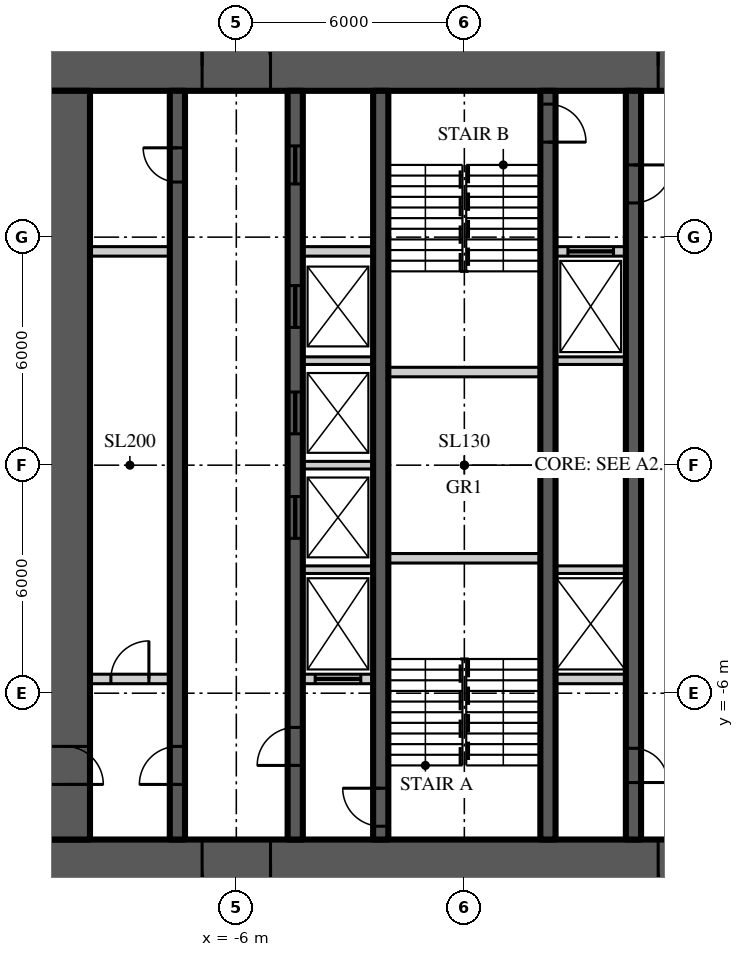
"""IFC4 building model, lengths in metres.
Left out: names, types, materials, properties, quantities, classifications, styles, units other than length and angle.
Written with IfcOpenShell. Run it as: python <this file> out.ifc"""

import sys

from ifc_helpers import new_model, si_unit, direction, frame, frame_2d, origin, place, context, subcontext, project, spatial, rectangle, extrude, element, fill, save


model = new_model("IFC4")
c1 = context("Model", 3, precision=1e-05, world=origin(), true_north=direction((0.0, 1.0)))
c2 = subcontext(c1, "Body", "Model", "MODEL_VIEW")
j1 = project(units=[si_unit("LENGTHUNIT", "METRE"), si_unit("PLANEANGLEUNIT", "RADIAN")], contexts=[c1])
p1 = place(None, origin())
s1 = spatial("IfcSite", under=j1, at=p1, CompositionType="ELEMENT")
p2 = place(p1, origin())
s2 = spatial("IfcBuilding", under=s1, at=p2, CompositionType="ELEMENT")
p3 = place(p2, frame((0.0, 0.0, 151.5)))
s3 = spatial("IfcBuildingStorey", under=s2, at=p3, CompositionType="ELEMENT", Elevation=151.5)
p4 = place(p3, frame((-11.15, 10.5, 0.0), z_axis=(0.0, 0.0, 1.0), x_axis=(1.0, 0.0, 0.0)))
e1 = element("IfcWall", 1, at=p4, inside=s3, PredefinedType="SHEAR", context=c2, shape_type="SweptSolid", body=[
    extrude(rectangle(XDim=22.3, YDim=1.3, at=frame_2d((11.15, 0.0))), origin(), (0.0, 0.0, 1.0), 3.9),
])
p5 = place(p4, frame((4.25, 0.0, 0.0)))
e2 = element("IfcOpeningElement", 2, at=p5, cuts=e1, PredefinedType="OPENING", context=c2, shape_type="SweptSolid", body=[
    extrude(rectangle(XDim=1.8, YDim=2.2, at=frame_2d((0.9, 1.1))), frame((0.0, 0.66, 0.0), z_axis=(0.0, -1.0, 0.0), x_axis=(1.0, 0.0, 0.0)), (0.0, 0.0, 1.0), 1.32),
])
p6 = place(p4, frame((16.25, 0.0, 0.0)))
e3 = element("IfcOpeningElement", 3, at=p6, cuts=e1, PredefinedType="OPENING", context=c2, shape_type="SweptSolid", body=[
    extrude(rectangle(XDim=1.8, YDim=2.2, at=frame_2d((0.9, 1.1))), frame((0.0, 0.66, 0.0), z_axis=(0.0, -1.0, 0.0), x_axis=(1.0, 0.0, 0.0)), (0.0, 0.0, 1.0), 1.32),
])
p7 = place(p3, frame((11.15, -10.5, 0.0), z_axis=(0.0, 0.0, 1.0), x_axis=(-1.0, 0.0, 0.0)))
e4 = element("IfcWall", 4, at=p7, inside=s3, PredefinedType="SHEAR", context=c2, shape_type="SweptSolid", body=[
    extrude(rectangle(XDim=22.3, YDim=1.3, at=frame_2d((11.15, 0.0))), origin(), (0.0, 0.0, 1.0), 3.9),
])
p8 = place(p7, frame((16.25, 0.0, 0.0)))
e5 = element("IfcOpeningElement", 5, at=p8, cuts=e4, PredefinedType="OPENING", context=c2, shape_type="SweptSolid", body=[
    extrude(rectangle(XDim=1.8, YDim=2.2, at=frame_2d((0.9, 1.1))), frame((0.0, 0.66, 0.0), z_axis=(0.0, -1.0, 0.0), x_axis=(1.0, 0.0, 0.0)), (0.0, 0.0, 1.0), 1.32),
])
p9 = place(p7, frame((4.25, 0.0, 0.0)))
e6 = element("IfcOpeningElement", 6, at=p9, cuts=e4, PredefinedType="OPENING", context=c2, shape_type="SweptSolid", body=[
    extrude(rectangle(XDim=1.8, YDim=2.2, at=frame_2d((0.9, 1.1))), frame((0.0, 0.66, 0.0), z_axis=(0.0, -1.0, 0.0), x_axis=(1.0, 0.0, 0.0)), (0.0, 0.0, 1.0), 1.32),
])
p10 = place(p3, frame((-10.5, 9.85, 0.0), z_axis=(0.0, 0.0, 1.0), x_axis=(0.0, -1.0, 0.0)))
e7 = element("IfcWall", 7, at=p10, inside=s3, PredefinedType="SHEAR", context=c2, shape_type="SweptSolid", body=[
    extrude(rectangle(XDim=19.7, YDim=1.3, at=frame_2d((9.85, 0.0))), origin(), (0.0, 0.0, 1.0), 3.9),
])
p11 = place(p10, frame((17.25, 0.0, 0.0)))
e8 = element("IfcOpeningElement", 8, at=p11, cuts=e7, PredefinedType="OPENING", context=c2, shape_type="SweptSolid", body=[
    extrude(rectangle(XDim=1.0, YDim=2.2, at=frame_2d((0.5, 1.1))), frame((0.0, 0.66, 0.0), z_axis=(0.0, -1.0, 0.0), x_axis=(1.0, 0.0, 0.0)), (0.0, 0.0, 1.0), 1.32),
])
p12 = place(p3, frame((-7.55, -9.85, 0.0), z_axis=(0.0, 0.0, 1.0), x_axis=(0.0, 1.0, 0.0)))
e9 = element("IfcWall", 9, at=p12, inside=s3, PredefinedType="SHEAR", context=c2, shape_type="SweptSolid", body=[
    extrude(rectangle(XDim=19.7, YDim=0.4, at=frame_2d((9.85, 0.0))), origin(), (0.0, 0.0, 1.0), 3.9),
])
p13 = place(p12, frame((1.45, 0.0, 0.0)))
e10 = element("IfcOpeningElement", 10, at=p13, cuts=e9, PredefinedType="OPENING", context=c2, shape_type="SweptSolid", body=[
    extrude(rectangle(XDim=1.0, YDim=2.2, at=frame_2d((0.5, 1.1))), frame((0.0, 0.21, 0.0), z_axis=(0.0, -1.0, 0.0), x_axis=(1.0, 0.0, 0.0)), (0.0, 0.0, 1.0), 0.42),
])
p14 = place(p12, frame((17.3, 0.0, 0.0)))
e11 = element("IfcOpeningElement", 11, at=p14, cuts=e9, PredefinedType="OPENING", context=c2, shape_type="SweptSolid", body=[
    extrude(rectangle(XDim=0.9, YDim=2.1, at=frame_2d((0.45, 1.05))), frame((0.0, 0.21, 0.0), z_axis=(0.0, -1.0, 0.0), x_axis=(1.0, 0.0, 0.0)), (0.0, 0.0, 1.0), 0.42),
])
p15 = place(p3, frame((-4.45, -9.85, 0.0), z_axis=(0.0, 0.0, 1.0), x_axis=(0.0, 1.0, 0.0)))
e12 = element("IfcWall", 12, at=p15, inside=s3, PredefinedType="SHEAR", context=c2, shape_type="SweptSolid", body=[
    extrude(rectangle(XDim=19.7, YDim=0.4, at=frame_2d((9.85, 0.0))), origin(), (0.0, 0.0, 1.0), 3.9),
])
p16 = place(p15, frame((1.95, 0.0, 0.0)))
e13 = element("IfcOpeningElement", 13, at=p16, cuts=e12, PredefinedType="OPENING", context=c2, shape_type="SweptSolid", body=[
    extrude(rectangle(XDim=1.0, YDim=2.2, at=frame_2d((0.5, 1.1))), frame((0.0, 0.21, 0.0), z_axis=(0.0, -1.0, 0.0), x_axis=(1.0, 0.0, 0.0)), (0.0, 0.0, 1.0), 0.42),
])
p17 = place(p15, frame((17.25, 0.0, 0.0)))
e14 = element("IfcOpeningElement", 14, at=p17, cuts=e12, PredefinedType="OPENING", context=c2, shape_type="SweptSolid", body=[
    extrude(rectangle(XDim=1.0, YDim=2.1, at=frame_2d((0.5, 1.05))), frame((0.0, 0.21, 0.0), z_axis=(0.0, -1.0, 0.0), x_axis=(1.0, 0.0, 0.0)), (0.0, 0.0, 1.0), 0.42),
])
p18 = place(p15, frame((7.925, 0.0, 0.0)))
e15 = element("IfcOpeningElement", 15, at=p18, cuts=e12, PredefinedType="OPENING", context=c2, shape_type="SweptSolid", body=[
    extrude(rectangle(XDim=1.1, YDim=2.2, at=frame_2d((0.55, 1.1))), frame((0.0, 0.21, 0.0), z_axis=(0.0, -1.0, 0.0), x_axis=(1.0, 0.0, 0.0)), (0.0, 0.0, 1.0), 0.42),
])
p19 = place(p15, frame((10.675, 0.0, 0.0)))
e16 = element("IfcOpeningElement", 16, at=p19, cuts=e12, PredefinedType="OPENING", context=c2, shape_type="SweptSolid", body=[
    extrude(rectangle(XDim=1.1, YDim=2.2, at=frame_2d((0.55, 1.1))), frame((0.0, 0.21, 0.0), z_axis=(0.0, -1.0, 0.0), x_axis=(1.0, 0.0, 0.0)), (0.0, 0.0, 1.0), 0.42),
])
p20 = place(p15, frame((13.475, 0.0, 0.0)))
e17 = element("IfcOpeningElement", 17, at=p20, cuts=e12, PredefinedType="OPENING", context=c2, shape_type="SweptSolid", body=[
    extrude(rectangle(XDim=1.1, YDim=2.2, at=frame_2d((0.55, 1.1))), frame((0.0, 0.21, 0.0), z_axis=(0.0, -1.0, 0.0), x_axis=(1.0, 0.0, 0.0)), (0.0, 0.0, 1.0), 0.42),
])
p21 = place(p3, frame((4.45, 9.85, 0.0), z_axis=(0.0, 0.0, 1.0), x_axis=(0.0, -1.0, 0.0)))
e18 = element("IfcWall", 18, at=p21, inside=s3, PredefinedType="SHEAR", context=c2, shape_type="SweptSolid", body=[
    extrude(rectangle(XDim=19.7, YDim=0.4, at=frame_2d((9.85, 0.0))), origin(), (0.0, 0.0, 1.0), 3.9),
])
p22 = place(p21, frame((1.95, 0.0, 0.0)))
e19 = element("IfcOpeningElement", 19, at=p22, cuts=e18, PredefinedType="OPENING", context=c2, shape_type="SweptSolid", body=[
    extrude(rectangle(XDim=1.0, YDim=2.2, at=frame_2d((0.5, 1.1))), frame((0.0, 0.21, 0.0), z_axis=(0.0, -1.0, 0.0), x_axis=(1.0, 0.0, 0.0)), (0.0, 0.0, 1.0), 0.42),
])
p23 = place(p21, frame((17.3, 0.0, 0.0)))
e20 = element("IfcOpeningElement", 20, at=p23, cuts=e18, PredefinedType="OPENING", context=c2, shape_type="SweptSolid", body=[
    extrude(rectangle(XDim=0.9, YDim=2.1, at=frame_2d((0.45, 1.05))), frame((0.0, 0.21, 0.0), z_axis=(0.0, -1.0, 0.0), x_axis=(1.0, 0.0, 0.0)), (0.0, 0.0, 1.0), 0.42),
])
p24 = place(p3, frame((-2.2, -9.85, 0.0), z_axis=(0.0, 0.0, 1.0), x_axis=(0.0, 1.0, 0.0)))
e21 = element("IfcWall", 21, at=p24, inside=s3, PredefinedType="SHEAR", context=c2, shape_type="SweptSolid", body=[
    extrude(rectangle(XDim=19.7, YDim=0.4, at=frame_2d((9.85, 0.0))), origin(), (0.0, 0.0, 1.0), 3.9),
])
p25 = place(p24, frame((0.35, 0.0, 0.0)))
e22 = element("IfcOpeningElement", 22, at=p25, cuts=e21, PredefinedType="OPENING", context=c2, shape_type="SweptSolid", body=[
    extrude(rectangle(XDim=1.0, YDim=2.2, at=frame_2d((0.5, 1.1))), frame((0.0, 0.21, 0.0), z_axis=(0.0, -1.0, 0.0), x_axis=(1.0, 0.0, 0.0)), (0.0, 0.0, 1.0), 0.42),
])
p26 = place(p3, frame((2.2, 9.85, 0.0), z_axis=(0.0, 0.0, 1.0), x_axis=(0.0, -1.0, 0.0)))
e23 = element("IfcWall", 23, at=p26, inside=s3, PredefinedType="SHEAR", context=c2, shape_type="SweptSolid", body=[
    extrude(rectangle(XDim=19.7, YDim=0.4, at=frame_2d((9.85, 0.0))), origin(), (0.0, 0.0, 1.0), 3.9),
])
p27 = place(p26, frame((0.35, 0.0, 0.0)))
e24 = element("IfcOpeningElement", 24, at=p27, cuts=e23, PredefinedType="OPENING", context=c2, shape_type="SweptSolid", body=[
    extrude(rectangle(XDim=1.0, YDim=2.2, at=frame_2d((0.5, 1.1))), frame((0.0, 0.21, 0.0), z_axis=(0.0, -1.0, 0.0), x_axis=(1.0, 0.0, 0.0)), (0.0, 0.0, 1.0), 0.42),
])
p28 = place(p3, frame((-9.85, 5.625, 0.0), z_axis=(0.0, 0.0, 1.0), x_axis=(1.0, 0.0, 0.0)))
e25 = element("IfcWall", 25, at=p28, inside=s3, PredefinedType="SOLIDWALL", context=c2, shape_type="SweptSolid", body=[
    extrude(rectangle(XDim=2.1, YDim=0.25, at=frame_2d((1.05, 0.0))), origin(), (0.0, 0.0, 1.0), 3.7),
])
p29 = place(p3, frame((-4.25, 5.625, 0.0), z_axis=(0.0, 0.0, 1.0), x_axis=(1.0, 0.0, 0.0)))
e26 = element("IfcWall", 26, at=p29, inside=s3, PredefinedType="SOLIDWALL", context=c2, shape_type="SweptSolid", body=[
    extrude(rectangle(XDim=1.85, YDim=0.25, at=frame_2d((0.925, 0.0))), origin(), (0.0, 0.0, 1.0), 3.7),
])
p30 = place(p3, frame((2.4, 5.625, 0.0), z_axis=(0.0, 0.0, 1.0), x_axis=(1.0, 0.0, 0.0)))
e27 = element("IfcWall", 27, at=p30, inside=s3, PredefinedType="SOLIDWALL", context=c2, shape_type="SweptSolid", body=[
    extrude(rectangle(XDim=1.85, YDim=0.25, at=frame_2d((0.925, 0.0))), origin(), (0.0, 0.0, 1.0), 3.7),
])
p31 = place(p30, frame((0.325, 0.0, 0.0)))
e28 = element("IfcOpeningElement", 28, at=p31, cuts=e27, PredefinedType="OPENING", context=c2, shape_type="SweptSolid", body=[
    extrude(rectangle(XDim=1.2, YDim=2.2, at=frame_2d((0.6, 1.1))), frame((0.0, 0.135, 0.0), z_axis=(0.0, -1.0, 0.0), x_axis=(1.0, 0.0, 0.0)), (0.0, 0.0, 1.0), 0.27),
])
p32 = place(p3, frame((-9.85, -5.625, 0.0), z_axis=(0.0, 0.0, 1.0), x_axis=(1.0, 0.0, 0.0)))
e29 = element("IfcWall", 29, at=p32, inside=s3, PredefinedType="SOLIDWALL", context=c2, shape_type="SweptSolid", body=[
    extrude(rectangle(XDim=2.1, YDim=0.25, at=frame_2d((1.05, 0.0))), origin(), (0.0, 0.0, 1.0), 3.7),
])
p33 = place(p32, frame((0.55, 0.0, 0.0)))
e30 = element("IfcOpeningElement", 30, at=p33, cuts=e29, PredefinedType="OPENING", context=c2, shape_type="SweptSolid", body=[
    extrude(rectangle(XDim=1.0, YDim=2.2, at=frame_2d((0.5, 1.1))), frame((0.0, 0.135, 0.0), z_axis=(0.0, -1.0, 0.0), x_axis=(1.0, 0.0, 0.0)), (0.0, 0.0, 1.0), 0.27),
])
p34 = place(p3, frame((-4.25, -5.625, 0.0), z_axis=(0.0, 0.0, 1.0), x_axis=(1.0, 0.0, 0.0)))
e31 = element("IfcWall", 31, at=p34, inside=s3, PredefinedType="SOLIDWALL", context=c2, shape_type="SweptSolid", body=[
    extrude(rectangle(XDim=1.85, YDim=0.25, at=frame_2d((0.925, 0.0))), origin(), (0.0, 0.0, 1.0), 3.7),
])
p35 = place(p34, frame((0.325, 0.0, 0.0)))
e32 = element("IfcOpeningElement", 32, at=p35, cuts=e31, PredefinedType="OPENING", context=c2, shape_type="SweptSolid", body=[
    extrude(rectangle(XDim=1.2, YDim=2.2, at=frame_2d((0.6, 1.1))), frame((0.0, 0.135, 0.0), z_axis=(0.0, -1.0, 0.0), x_axis=(1.0, 0.0, 0.0)), (0.0, 0.0, 1.0), 0.27),
])
p36 = place(p3, frame((2.4, -5.625, 0.0), z_axis=(0.0, 0.0, 1.0), x_axis=(1.0, 0.0, 0.0)))
e33 = element("IfcWall", 33, at=p36, inside=s3, PredefinedType="SOLIDWALL", context=c2, shape_type="SweptSolid", body=[
    extrude(rectangle(XDim=1.85, YDim=0.25, at=frame_2d((0.925, 0.0))), origin(), (0.0, 0.0, 1.0), 3.7),
])
for number, where, z_axis, x_axis in (
    (34, (-2.0, -2.45, 0.0), (0.0, 0.0, 1.0), (1.0, 0.0, 0.0)),
    (35, (-2.0, 2.45, 0.0), (0.0, 0.0, 1.0), (1.0, 0.0, 0.0)),
):
    element("IfcWall", number, at=place(p3, frame(where, z_axis=z_axis, x_axis=x_axis)), inside=s3, PredefinedType="SOLIDWALL", context=c2, shape_type="SweptSolid", body=[
        extrude(rectangle(XDim=4.0, YDim=0.25, at=frame_2d((2.0, 0.0))), origin(), (0.0, 0.0, 1.0), 3.7),
    ])
for number, where, z_axis, x_axis in (
    (36, (-4.25, -2.75, 0.0), (0.0, 0.0, 1.0), (1.0, 0.0, 0.0)),
    (37, (2.4, -2.75, 0.0), (0.0, 0.0, 1.0), (1.0, 0.0, 0.0)),
    (38, (-4.25, 0.0, 0.0), (0.0, 0.0, 1.0), (1.0, 0.0, 0.0)),
    (39, (-4.25, 2.75, 0.0), (0.0, 0.0, 1.0), (1.0, 0.0, 0.0)),
    (40, (2.4, 2.75, 0.0), (0.0, 0.0, 1.0), (1.0, 0.0, 0.0)),
):
    element("IfcWall", number, at=place(p3, frame(where, z_axis=z_axis, x_axis=x_axis)), inside=s3, PredefinedType="SOLIDWALL", context=c2, shape_type="SweptSolid", body=[
        extrude(rectangle(XDim=1.85, YDim=0.2, at=frame_2d((0.925, 0.0))), origin(), (0.0, 0.0, 1.0), 3.7),
    ])
p37 = place(p5, origin())
e41 = element("IfcDoor", 41, at=p37, inside=s3, OperationType="DOUBLE_DOOR_DOUBLE_SWING", PredefinedType="DOOR", context=c2, shape_type="SweptSolid", body=[
    extrude(rectangle(XDim=1.8, YDim=2.2, at=frame_2d((0.9, 1.1))), frame((0.0, 0.025, 0.0), z_axis=(0.0, -1.0, 0.0), x_axis=(1.0, 0.0, 0.0)), (0.0, 0.0, 1.0), 0.05),
])
fill(e2, e41)
p38 = place(p8, origin())
e42 = element("IfcDoor", 42, at=p38, inside=s3, OperationType="DOUBLE_DOOR_DOUBLE_SWING", PredefinedType="DOOR", context=c2, shape_type="SweptSolid", body=[
    extrude(rectangle(XDim=1.8, YDim=2.2, at=frame_2d((0.9, 1.1))), frame((0.0, 0.025, 0.0), z_axis=(0.0, -1.0, 0.0), x_axis=(1.0, 0.0, 0.0)), (0.0, 0.0, 1.0), 0.05),
])
fill(e5, e42)
p39 = place(p6, origin())
e43 = element("IfcDoor", 43, at=p39, inside=s3, OperationType="DOUBLE_DOOR_DOUBLE_SWING", PredefinedType="DOOR", context=c2, shape_type="SweptSolid", body=[
    extrude(rectangle(XDim=1.8, YDim=2.2, at=frame_2d((0.9, 1.1))), frame((0.0, 0.025, 0.0), z_axis=(0.0, -1.0, 0.0), x_axis=(1.0, 0.0, 0.0)), (0.0, 0.0, 1.0), 0.05),
])
fill(e3, e43)
p40 = place(p9, origin())
e44 = element("IfcDoor", 44, at=p40, inside=s3, OperationType="DOUBLE_DOOR_DOUBLE_SWING", PredefinedType="DOOR", context=c2, shape_type="SweptSolid", body=[
    extrude(rectangle(XDim=1.8, YDim=2.2, at=frame_2d((0.9, 1.1))), frame((0.0, 0.025, 0.0), z_axis=(0.0, -1.0, 0.0), x_axis=(1.0, 0.0, 0.0)), (0.0, 0.0, 1.0), 0.05),
])
fill(e6, e44)
p41 = place(p13, origin())
e45 = element("IfcDoor", 45, at=p41, inside=s3, OperationType="SINGLE_SWING_LEFT", PredefinedType="DOOR", context=c2, shape_type="SweptSolid", body=[
    extrude(rectangle(XDim=1.0, YDim=2.2, at=frame_2d((0.5, 1.1))), frame((0.0, 0.025, 0.0), z_axis=(0.0, -1.0, 0.0), x_axis=(1.0, 0.0, 0.0)), (0.0, 0.0, 1.0), 0.05),
])
fill(e10, e45)
p42 = place(p11, origin())
e46 = element("IfcDoor", 46, at=p42, inside=s3, OperationType="SINGLE_SWING_RIGHT", PredefinedType="DOOR", context=c2, shape_type="SweptSolid", body=[
    extrude(rectangle(XDim=1.0, YDim=2.2, at=frame_2d((0.5, 1.1))), frame((0.0, 0.025, 0.0), z_axis=(0.0, -1.0, 0.0), x_axis=(1.0, 0.0, 0.0)), (0.0, 0.0, 1.0), 0.05),
])
fill(e8, e46)
p43 = place(p16, origin())
e47 = element("IfcDoor", 47, at=p43, inside=s3, OperationType="SINGLE_SWING_LEFT", PredefinedType="DOOR", context=c2, shape_type="SweptSolid", body=[
    extrude(rectangle(XDim=1.0, YDim=2.2, at=frame_2d((0.5, 1.1))), frame((0.0, 0.025, 0.0), z_axis=(0.0, -1.0, 0.0), x_axis=(1.0, 0.0, 0.0)), (0.0, 0.0, 1.0), 0.05),
])
fill(e13, e47)
p44 = place(p25, origin())
e48 = element("IfcDoor", 48, at=p44, inside=s3, OperationType="SINGLE_SWING_RIGHT", PredefinedType="DOOR", context=c2, shape_type="SweptSolid", body=[
    extrude(rectangle(XDim=1.0, YDim=2.2, at=frame_2d((0.5, 1.1))), frame((0.0, 0.025, 0.0), z_axis=(0.0, -1.0, 0.0), x_axis=(1.0, 0.0, 0.0)), (0.0, 0.0, 1.0), 0.05),
])
fill(e22, e48)
p45 = place(p22, origin())
e49 = element("IfcDoor", 49, at=p45, inside=s3, OperationType="SINGLE_SWING_LEFT", PredefinedType="DOOR", context=c2, shape_type="SweptSolid", body=[
    extrude(rectangle(XDim=1.0, YDim=2.2, at=frame_2d((0.5, 1.1))), frame((0.0, 0.025, 0.0), z_axis=(0.0, -1.0, 0.0), x_axis=(1.0, 0.0, 0.0)), (0.0, 0.0, 1.0), 0.05),
])
fill(e19, e49)
p46 = place(p27, origin())
e50 = element("IfcDoor", 50, at=p46, inside=s3, OperationType="SINGLE_SWING_RIGHT", PredefinedType="DOOR", context=c2, shape_type="SweptSolid", body=[
    extrude(rectangle(XDim=1.0, YDim=2.2, at=frame_2d((0.5, 1.1))), frame((0.0, 0.025, 0.0), z_axis=(0.0, -1.0, 0.0), x_axis=(1.0, 0.0, 0.0)), (0.0, 0.0, 1.0), 0.05),
])
fill(e24, e50)
p47 = place(p14, origin())
e51 = element("IfcDoor", 51, at=p47, inside=s3, OperationType="SINGLE_SWING_RIGHT", PredefinedType="DOOR", context=c2, shape_type="SweptSolid", body=[
    extrude(rectangle(XDim=0.9, YDim=2.1, at=frame_2d((0.45, 1.05))), frame((0.0, 0.025, 0.0), z_axis=(0.0, -1.0, 0.0), x_axis=(1.0, 0.0, 0.0)), (0.0, 0.0, 1.0), 0.05),
])
fill(e11, e51)
p48 = place(p17, origin())
e52 = element("IfcDoor", 52, at=p48, inside=s3, OperationType="SLIDING_TO_LEFT", PredefinedType="DOOR", context=c2, shape_type="SweptSolid", body=[
    extrude(rectangle(XDim=1.0, YDim=2.1, at=frame_2d((0.5, 1.05))), frame((0.0, 0.025, 0.0), z_axis=(0.0, -1.0, 0.0), x_axis=(1.0, 0.0, 0.0)), (0.0, 0.0, 1.0), 0.05),
])
fill(e14, e52)
p49 = place(p23, origin())
e53 = element("IfcDoor", 53, at=p49, inside=s3, OperationType="SINGLE_SWING_RIGHT", PredefinedType="DOOR", context=c2, shape_type="SweptSolid", body=[
    extrude(rectangle(XDim=0.9, YDim=2.1, at=frame_2d((0.45, 1.05))), frame((0.0, 0.025, 0.0), z_axis=(0.0, -1.0, 0.0), x_axis=(1.0, 0.0, 0.0)), (0.0, 0.0, 1.0), 0.05),
])
fill(e20, e53)
p50 = place(p18, origin())
e54 = element("IfcDoor", 54, at=p50, inside=s3, OperationType="SLIDING_TO_LEFT", PredefinedType="DOOR", context=c2, shape_type="SweptSolid", body=[
    extrude(rectangle(XDim=1.1, YDim=2.2, at=frame_2d((0.55, 1.1))), frame((0.0, 0.025, 0.0), z_axis=(0.0, -1.0, 0.0), x_axis=(1.0, 0.0, 0.0)), (0.0, 0.0, 1.0), 0.05),
])
fill(e15, e54)
p51 = place(p19, origin())
e55 = element("IfcDoor", 55, at=p51, inside=s3, OperationType="SLIDING_TO_LEFT", PredefinedType="DOOR", context=c2, shape_type="SweptSolid", body=[
    extrude(rectangle(XDim=1.1, YDim=2.2, at=frame_2d((0.55, 1.1))), frame((0.0, 0.025, 0.0), z_axis=(0.0, -1.0, 0.0), x_axis=(1.0, 0.0, 0.0)), (0.0, 0.0, 1.0), 0.05),
])
fill(e16, e55)
p52 = place(p20, origin())
e56 = element("IfcDoor", 56, at=p52, inside=s3, OperationType="SLIDING_TO_LEFT", PredefinedType="DOOR", context=c2, shape_type="SweptSolid", body=[
    extrude(rectangle(XDim=1.1, YDim=2.2, at=frame_2d((0.55, 1.1))), frame((0.0, 0.025, 0.0), z_axis=(0.0, -1.0, 0.0), x_axis=(1.0, 0.0, 0.0)), (0.0, 0.0, 1.0), 0.05),
])
fill(e17, e56)
p53 = place(p35, origin())
e57 = element("IfcDoor", 57, at=p53, inside=s3, OperationType="SLIDING_TO_LEFT", PredefinedType="DOOR", context=c2, shape_type="SweptSolid", body=[
    extrude(rectangle(XDim=1.2, YDim=2.2, at=frame_2d((0.6, 1.1))), frame((0.0, 0.025, 0.0), z_axis=(0.0, -1.0, 0.0), x_axis=(1.0, 0.0, 0.0)), (0.0, 0.0, 1.0), 0.05),
])
fill(e32, e57)
p54 = place(p31, origin())
e58 = element("IfcDoor", 58, at=p54, inside=s3, OperationType="SLIDING_TO_LEFT", PredefinedType="DOOR", context=c2, shape_type="SweptSolid", body=[
    extrude(rectangle(XDim=1.2, YDim=2.2, at=frame_2d((0.6, 1.1))), frame((0.0, 0.025, 0.0), z_axis=(0.0, -1.0, 0.0), x_axis=(1.0, 0.0, 0.0)), (0.0, 0.0, 1.0), 0.05),
])
fill(e28, e58)
p55 = place(p33, origin())
e59 = element("IfcDoor", 59, at=p55, inside=s3, OperationType="SINGLE_SWING_RIGHT", PredefinedType="DOOR", context=c2, shape_type="SweptSolid", body=[
    extrude(rectangle(XDim=1.0, YDim=2.2, at=frame_2d((0.5, 1.1))), frame((0.0, 0.025, 0.0), z_axis=(0.0, -1.0, 0.0), x_axis=(1.0, 0.0, 0.0)), (0.0, 0.0, 1.0), 0.05),
])
fill(e30, e59)
save(model, sys.argv[1])
